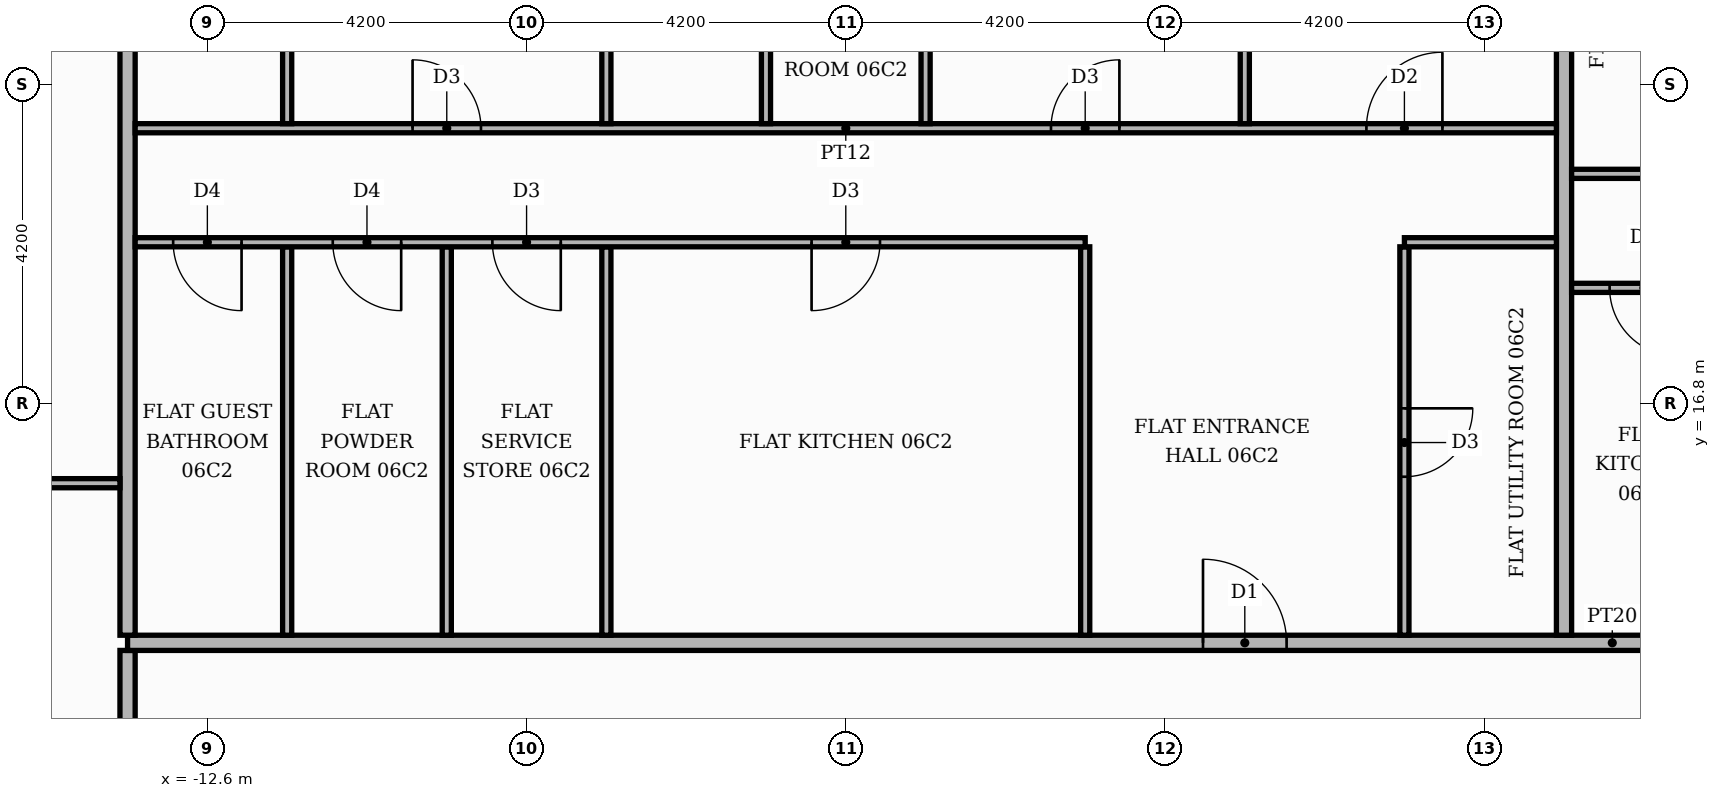
"""IFC4 building model, lengths in metres.
Left out: names, types, materials, properties, quantities, classifications, styles, units other than length and angle.
Written with IfcOpenShell. Run it as: python <this file> out.ifc"""

import sys

from ifc_helpers import new_model, si_unit, direction, frame, frame_2d, origin, place, context, subcontext, project, spatial, rectangle, extrude, element, fill, save


model = new_model("IFC4")
c1 = context("Model", 3, precision=1e-05, world=origin(), true_north=direction((0.0, 1.0)))
c2 = subcontext(c1, "Body", "Model", "MODEL_VIEW")
j1 = project(units=[si_unit("LENGTHUNIT", "METRE"), si_unit("PLANEANGLEUNIT", "RADIAN")], contexts=[c1])
p1 = place(None, origin())
s1 = spatial("IfcSite", under=j1, at=p1, CompositionType="ELEMENT")
p2 = place(p1, origin())
s2 = spatial("IfcBuilding", under=s1, at=p2, CompositionType="ELEMENT")
p3 = place(p2, frame((0.0, 0.0, 30.9)))
s3 = spatial("IfcBuildingStorey", under=s2, at=p3, CompositionType="ELEMENT", Elevation=30.9)
p4 = place(p3, frame((-13.65, -13.55, 0.0), z_axis=(0.0, 0.0, 1.0), x_axis=(0.0, 1.0, 0.0)))
e1 = element("IfcWall", 1, at=p4, inside=s3, PredefinedType="PARTITIONING", context=c2, shape_type="SweptSolid", body=[
    extrude(rectangle(XDim=27.1, YDim=0.2, at=frame_2d((13.55, 0.0))), origin(), (0.0, 0.0, 1.0), 3.48),
])
p5 = place(p4, frame((24.55, 0.0, 0.0)))
e2 = element("IfcOpeningElement", 2, at=p5, cuts=e1, PredefinedType="OPENING", context=c2, shape_type="SweptSolid", body=[
    extrude(rectangle(XDim=1.1, YDim=2.4, at=frame_2d((0.55, 1.2))), frame((0.0, 0.11, 0.0), z_axis=(0.0, -1.0, 0.0), x_axis=(1.0, 0.0, 0.0)), (0.0, 0.0, 1.0), 0.22),
])
p6 = place(p3, frame((-13.65, 13.65, 0.0), z_axis=(0.0, 0.0, 1.0), x_axis=(1.0, 0.0, 0.0)))
e3 = element("IfcWall", 3, at=p6, inside=s3, PredefinedType="PARTITIONING", context=c2, shape_type="SweptSolid", body=[
    extrude(rectangle(XDim=39.07, YDim=0.2, at=frame_2d((19.535, 0.0))), origin(), (0.0, 0.0, 1.0), 3.48),
])
p7 = place(p6, frame((24.65, 0.0, 0.0)))
e4 = element("IfcOpeningElement", 4, at=p7, cuts=e3, PredefinedType="OPENING", context=c2, shape_type="SweptSolid", body=[
    extrude(rectangle(XDim=1.1, YDim=2.4, at=frame_2d((0.55, 1.2))), frame((0.0, 0.11, 0.0), z_axis=(0.0, -1.0, 0.0), x_axis=(1.0, 0.0, 0.0)), (0.0, 0.0, 1.0), 0.22),
])
p8 = place(p6, frame((14.15, 0.0, 0.0)))
e5 = element("IfcOpeningElement", 5, at=p8, cuts=e3, PredefinedType="OPENING", context=c2, shape_type="SweptSolid", body=[
    extrude(rectangle(XDim=1.1, YDim=2.4, at=frame_2d((0.55, 1.2))), frame((0.0, 0.11, 0.0), z_axis=(0.0, -1.0, 0.0), x_axis=(1.0, 0.0, 0.0)), (0.0, 0.0, 1.0), 0.22),
])
p9 = place(p3, frame((-13.65, 13.75, 0.0), z_axis=(0.0, 0.0, 1.0), x_axis=(0.0, 1.0, 0.0)))
e6 = element("IfcWall", 6, at=p9, inside=s3, PredefinedType="PARTITIONING", context=c2, shape_type="SweptSolid", body=[
    extrude(rectangle(XDim=11.67, YDim=0.2, at=frame_2d((5.835, 0.0))), origin(), (0.0, 0.0, 1.0), 3.48),
])
for number, where, z_axis, x_axis in (
    (7, (-11.55, 13.75, 0.0), (0.0, 0.0, 1.0), (0.0, 1.0, 0.0)),
    (8, (-9.45, 13.75, 0.0), (0.0, 0.0, 1.0), (0.0, 1.0, 0.0)),
    (9, (-7.35, 13.75, 0.0), (0.0, 0.0, 1.0), (0.0, 1.0, 0.0)),
    (10, (-1.05, 13.75, 0.0), (0.0, 0.0, 1.0), (0.0, 1.0, 0.0)),
):
    element("IfcWall", number, at=place(p3, frame(where, z_axis=z_axis, x_axis=x_axis)), inside=s3, PredefinedType="PARTITIONING", context=c2, shape_type="SweptSolid", body=[
        extrude(rectangle(XDim=5.11, YDim=0.12, at=frame_2d((2.555, 0.0))), origin(), (0.0, 0.0, 1.0), 3.48),
    ])
p10 = place(p3, frame((3.15, 13.75, 0.0), z_axis=(0.0, 0.0, 1.0), x_axis=(0.0, 1.0, 0.0)))
e11 = element("IfcWall", 11, at=p10, inside=s3, PredefinedType="PARTITIONING", context=c2, shape_type="SweptSolid", body=[
    extrude(rectangle(XDim=5.11, YDim=0.12, at=frame_2d((2.555, 0.0))), origin(), (0.0, 0.0, 1.0), 3.48),
])
p11 = place(p10, frame((2.085, 0.0, 0.0)))
e12 = element("IfcOpeningElement", 12, at=p11, cuts=e11, PredefinedType="OPENING", context=c2, shape_type="SweptSolid", body=[
    extrude(rectangle(XDim=0.9, YDim=2.1, at=frame_2d((0.45, 1.05))), frame((0.0, 0.07, 0.0), z_axis=(0.0, -1.0, 0.0), x_axis=(1.0, 0.0, 0.0)), (0.0, 0.0, 1.0), 0.14),
])
p12 = place(p3, frame((5.25, 13.75, 0.0), z_axis=(0.0, 0.0, 1.0), x_axis=(0.0, 1.0, 0.0)))
e13 = element("IfcWall", 13, at=p12, inside=s3, PredefinedType="PARTITIONING", context=c2, shape_type="SweptSolid", body=[
    extrude(rectangle(XDim=11.67, YDim=0.2, at=frame_2d((5.835, 0.0))), origin(), (0.0, 0.0, 1.0), 3.48),
])
p13 = place(p3, frame((-20.72, 15.75, 0.0), z_axis=(0.0, 0.0, 1.0), x_axis=(1.0, 0.0, 0.0)))
e14 = element("IfcWall", 14, at=p13, inside=s3, PredefinedType="PARTITIONING", context=c2, shape_type="SweptSolid", body=[
    extrude(rectangle(XDim=6.97, YDim=0.12, at=frame_2d((3.485, 0.0))), origin(), (0.0, 0.0, 1.0), 3.48),
])
p14 = place(p13, frame((3.085, 0.0, 0.0)))
e15 = element("IfcOpeningElement", 15, at=p14, cuts=e14, PredefinedType="OPENING", context=c2, shape_type="SweptSolid", body=[
    extrude(rectangle(XDim=0.9, YDim=2.1, at=frame_2d((0.45, 1.05))), frame((0.0, 0.07, 0.0), z_axis=(0.0, -1.0, 0.0), x_axis=(1.0, 0.0, 0.0)), (0.0, 0.0, 1.0), 0.14),
])
p15 = place(p3, frame((5.35, 18.32, 0.0), z_axis=(0.0, 0.0, 1.0), x_axis=(1.0, 0.0, 0.0)))
e16 = element("IfcWall", 16, at=p15, inside=s3, PredefinedType="PARTITIONING", context=c2, shape_type="SweptSolid", body=[
    extrude(rectangle(XDim=4.1, YDim=0.12, at=frame_2d((2.05, 0.0))), origin(), (0.0, 0.0, 1.0), 3.48),
])
p16 = place(p15, frame((0.5, 0.0, 0.0)))
e17 = element("IfcOpeningElement", 17, at=p16, cuts=e16, PredefinedType="OPENING", context=c2, shape_type="SweptSolid", body=[
    extrude(rectangle(XDim=0.9, YDim=2.1, at=frame_2d((0.45, 1.05))), frame((0.0, 0.07, 0.0), z_axis=(0.0, -1.0, 0.0), x_axis=(1.0, 0.0, 0.0)), (0.0, 0.0, 1.0), 0.14),
])
p17 = place(p3, frame((-13.55, 18.92, 0.0), z_axis=(0.0, 0.0, 1.0), x_axis=(1.0, 0.0, 0.0)))
e18 = element("IfcWall", 18, at=p17, inside=s3, PredefinedType="PARTITIONING", context=c2, shape_type="SweptSolid", body=[
    extrude(rectangle(XDim=12.5, YDim=0.12, at=frame_2d((6.25, 0.0))), origin(), (0.0, 0.0, 1.0), 3.48),
])
p18 = place(p17, frame((8.9, 0.0, 0.0)))
e19 = element("IfcOpeningElement", 19, at=p18, cuts=e18, PredefinedType="OPENING", context=c2, shape_type="SweptSolid", body=[
    extrude(rectangle(XDim=0.9, YDim=2.1, at=frame_2d((0.45, 1.05))), frame((0.0, 0.07, 0.0), z_axis=(0.0, -1.0, 0.0), x_axis=(1.0, 0.0, 0.0)), (0.0, 0.0, 1.0), 0.14),
])
p19 = place(p17, frame((4.7, 0.0, 0.0)))
e20 = element("IfcOpeningElement", 20, at=p19, cuts=e18, PredefinedType="OPENING", context=c2, shape_type="SweptSolid", body=[
    extrude(rectangle(XDim=0.9, YDim=2.1, at=frame_2d((0.45, 1.05))), frame((0.0, 0.07, 0.0), z_axis=(0.0, -1.0, 0.0), x_axis=(1.0, 0.0, 0.0)), (0.0, 0.0, 1.0), 0.14),
])
p20 = place(p17, frame((2.6, 0.0, 0.0)))
e21 = element("IfcOpeningElement", 21, at=p20, cuts=e18, PredefinedType="OPENING", context=c2, shape_type="SweptSolid", body=[
    extrude(rectangle(XDim=0.9, YDim=2.1, at=frame_2d((0.45, 1.05))), frame((0.0, 0.07, 0.0), z_axis=(0.0, -1.0, 0.0), x_axis=(1.0, 0.0, 0.0)), (0.0, 0.0, 1.0), 0.14),
])
p21 = place(p17, frame((0.5, 0.0, 0.0)))
e22 = element("IfcOpeningElement", 22, at=p21, cuts=e18, PredefinedType="OPENING", context=c2, shape_type="SweptSolid", body=[
    extrude(rectangle(XDim=0.9, YDim=2.1, at=frame_2d((0.45, 1.05))), frame((0.0, 0.07, 0.0), z_axis=(0.0, -1.0, 0.0), x_axis=(1.0, 0.0, 0.0)), (0.0, 0.0, 1.0), 0.14),
])
p22 = place(p3, frame((3.15, 18.92, 0.0), z_axis=(0.0, 0.0, 1.0), x_axis=(1.0, 0.0, 0.0)))
e23 = element("IfcWall", 23, at=p22, inside=s3, PredefinedType="PARTITIONING", context=c2, shape_type="SweptSolid", body=[
    extrude(rectangle(XDim=2.0, YDim=0.12, at=frame_2d((1.0, 0.0))), origin(), (0.0, 0.0, 1.0), 3.48),
])
p23 = place(p3, frame((5.35, 19.82, 0.0), z_axis=(0.0, 0.0, 1.0), x_axis=(1.0, 0.0, 0.0)))
e24 = element("IfcWall", 24, at=p23, inside=s3, PredefinedType="PARTITIONING", context=c2, shape_type="SweptSolid", body=[
    extrude(rectangle(XDim=11.95, YDim=0.12, at=frame_2d((5.975, 0.0))), origin(), (0.0, 0.0, 1.0), 3.48),
])
p24 = place(p23, frame((8.85, 0.0, 0.0)))
e25 = element("IfcOpeningElement", 25, at=p24, cuts=e24, PredefinedType="OPENING", context=c2, shape_type="SweptSolid", body=[
    extrude(rectangle(XDim=1.0, YDim=2.1, at=frame_2d((0.5, 1.05))), frame((0.0, 0.07, 0.0), z_axis=(0.0, -1.0, 0.0), x_axis=(1.0, 0.0, 0.0)), (0.0, 0.0, 1.0), 0.14),
])
p25 = place(p23, frame((5.75, 0.0, 0.0)))
e26 = element("IfcOpeningElement", 26, at=p25, cuts=e24, PredefinedType="OPENING", context=c2, shape_type="SweptSolid", body=[
    extrude(rectangle(XDim=0.9, YDim=2.1, at=frame_2d((0.45, 1.05))), frame((0.0, 0.07, 0.0), z_axis=(0.0, -1.0, 0.0), x_axis=(1.0, 0.0, 0.0)), (0.0, 0.0, 1.0), 0.14),
])
p26 = place(p3, frame((-13.55, 20.42, 0.0), z_axis=(0.0, 0.0, 1.0), x_axis=(1.0, 0.0, 0.0)))
e27 = element("IfcWall", 27, at=p26, inside=s3, PredefinedType="PARTITIONING", context=c2, shape_type="SweptSolid", body=[
    extrude(rectangle(XDim=18.7, YDim=0.12, at=frame_2d((9.35, 0.0))), origin(), (0.0, 0.0, 1.0), 3.48),
])
p27 = place(p26, frame((16.2, 0.0, 0.0)))
e28 = element("IfcOpeningElement", 28, at=p27, cuts=e27, PredefinedType="OPENING", context=c2, shape_type="SweptSolid", body=[
    extrude(rectangle(XDim=1.0, YDim=2.1, at=frame_2d((0.5, 1.05))), frame((0.0, 0.07, 0.0), z_axis=(0.0, -1.0, 0.0), x_axis=(1.0, 0.0, 0.0)), (0.0, 0.0, 1.0), 0.14),
])
p28 = place(p26, frame((12.05, 0.0, 0.0)))
e29 = element("IfcOpeningElement", 29, at=p28, cuts=e27, PredefinedType="OPENING", context=c2, shape_type="SweptSolid", body=[
    extrude(rectangle(XDim=0.9, YDim=2.1, at=frame_2d((0.45, 1.05))), frame((0.0, 0.07, 0.0), z_axis=(0.0, -1.0, 0.0), x_axis=(1.0, 0.0, 0.0)), (0.0, 0.0, 1.0), 0.14),
])
p29 = place(p26, frame((3.65, 0.0, 0.0)))
e30 = element("IfcOpeningElement", 30, at=p29, cuts=e27, PredefinedType="OPENING", context=c2, shape_type="SweptSolid", body=[
    extrude(rectangle(XDim=0.9, YDim=2.1, at=frame_2d((0.45, 1.05))), frame((0.0, 0.07, 0.0), z_axis=(0.0, -1.0, 0.0), x_axis=(1.0, 0.0, 0.0)), (0.0, 0.0, 1.0), 0.14),
])
p30 = place(p3, frame((-11.55, 20.48, 0.0), z_axis=(0.0, 0.0, 1.0), x_axis=(0.0, 1.0, 0.0)))
e31 = element("IfcWall", 31, at=p30, inside=s3, PredefinedType="PARTITIONING", context=c2, shape_type="SweptSolid", body=[
    extrude(rectangle(XDim=4.94, YDim=0.12, at=frame_2d((2.47, 0.0))), origin(), (0.0, 0.0, 1.0), 3.48),
])
p31 = place(p30, frame((2.14, 0.0, 0.0)))
e32 = element("IfcOpeningElement", 32, at=p31, cuts=e31, PredefinedType="OPENING", context=c2, shape_type="SweptSolid", body=[
    extrude(rectangle(XDim=0.9, YDim=2.1, at=frame_2d((0.45, 1.05))), frame((0.0, 0.07, 0.0), z_axis=(0.0, -1.0, 0.0), x_axis=(1.0, 0.0, 0.0)), (0.0, 0.0, 1.0), 0.14),
])
p32 = place(p3, frame((-7.35, 20.48, 0.0), z_axis=(0.0, 0.0, 1.0), x_axis=(0.0, 1.0, 0.0)))
e33 = element("IfcWall", 33, at=p32, inside=s3, PredefinedType="PARTITIONING", context=c2, shape_type="SweptSolid", body=[
    extrude(rectangle(XDim=4.94, YDim=0.12, at=frame_2d((2.47, 0.0))), origin(), (0.0, 0.0, 1.0), 3.48),
])
p33 = place(p3, frame((-5.25, 20.48, 0.0), z_axis=(0.0, 0.0, 1.0), x_axis=(0.0, 1.0, 0.0)))
e34 = element("IfcWall", 34, at=p33, inside=s3, PredefinedType="PARTITIONING", context=c2, shape_type="SweptSolid", body=[
    extrude(rectangle(XDim=4.94, YDim=0.12, at=frame_2d((2.47, 0.0))), origin(), (0.0, 0.0, 1.0), 3.48),
])
p34 = place(p33, frame((2.14, 0.0, 0.0)))
e35 = element("IfcOpeningElement", 35, at=p34, cuts=e34, PredefinedType="OPENING", context=c2, shape_type="SweptSolid", body=[
    extrude(rectangle(XDim=0.9, YDim=2.1, at=frame_2d((0.45, 1.05))), frame((0.0, 0.07, 0.0), z_axis=(0.0, -1.0, 0.0), x_axis=(1.0, 0.0, 0.0)), (0.0, 0.0, 1.0), 0.14),
])
p35 = place(p3, frame((-3.15, 20.48, 0.0), z_axis=(0.0, 0.0, 1.0), x_axis=(0.0, 1.0, 0.0)))
e36 = element("IfcWall", 36, at=p35, inside=s3, PredefinedType="PARTITIONING", context=c2, shape_type="SweptSolid", body=[
    extrude(rectangle(XDim=4.94, YDim=0.12, at=frame_2d((2.47, 0.0))), origin(), (0.0, 0.0, 1.0), 3.48),
])
p36 = place(p35, frame((2.14, 0.0, 0.0)))
e37 = element("IfcOpeningElement", 37, at=p36, cuts=e36, PredefinedType="OPENING", context=c2, shape_type="SweptSolid", body=[
    extrude(rectangle(XDim=0.9, YDim=2.1, at=frame_2d((0.45, 1.05))), frame((0.0, 0.07, 0.0), z_axis=(0.0, -1.0, 0.0), x_axis=(1.0, 0.0, 0.0)), (0.0, 0.0, 1.0), 0.14),
])
p37 = place(p3, frame((1.05, 20.48, 0.0), z_axis=(0.0, 0.0, 1.0), x_axis=(0.0, 1.0, 0.0)))
e38 = element("IfcWall", 38, at=p37, inside=s3, PredefinedType="PARTITIONING", context=c2, shape_type="SweptSolid", body=[
    extrude(rectangle(XDim=4.94, YDim=0.12, at=frame_2d((2.47, 0.0))), origin(), (0.0, 0.0, 1.0), 3.48),
])
p38 = place(p16, frame((0.9, 0.0, 0.0), z_axis=(0.0, 0.0, 1.0), x_axis=(-1.0, 0.0, 0.0)))
e39 = element("IfcDoor", 39, at=p38, inside=s3, OperationType="SINGLE_SWING_RIGHT", PredefinedType="DOOR", context=c2, shape_type="SweptSolid", body=[
    extrude(rectangle(XDim=0.9, YDim=2.1, at=frame_2d((0.45, 1.05))), frame((0.0, 0.025, 0.0), z_axis=(0.0, -1.0, 0.0), x_axis=(1.0, 0.0, 0.0)), (0.0, 0.0, 1.0), 0.05),
])
fill(e17, e39)
p39 = place(p8, origin())
e40 = element("IfcDoor", 40, at=p39, inside=s3, OperationType="SINGLE_SWING_LEFT", PredefinedType="DOOR", context=c2, shape_type="SweptSolid", body=[
    extrude(rectangle(XDim=1.1, YDim=2.4, at=frame_2d((0.55, 1.2))), frame((0.0, 0.025, 0.0), z_axis=(0.0, -1.0, 0.0), x_axis=(1.0, 0.0, 0.0)), (0.0, 0.0, 1.0), 0.05),
])
fill(e5, e40)
p40 = place(p11, frame((0.9, 0.0, 0.0), z_axis=(0.0, 0.0, 1.0), x_axis=(-1.0, 0.0, 0.0)))
e41 = element("IfcDoor", 41, at=p40, inside=s3, OperationType="SINGLE_SWING_RIGHT", PredefinedType="DOOR", context=c2, shape_type="SweptSolid", body=[
    extrude(rectangle(XDim=0.9, YDim=2.1, at=frame_2d((0.45, 1.05))), frame((0.0, 0.025, 0.0), z_axis=(0.0, -1.0, 0.0), x_axis=(1.0, 0.0, 0.0)), (0.0, 0.0, 1.0), 0.05),
])
fill(e12, e41)
p41 = place(p18, frame((0.9, 0.0, 0.0), z_axis=(0.0, 0.0, 1.0), x_axis=(-1.0, 0.0, 0.0)))
e42 = element("IfcDoor", 42, at=p41, inside=s3, OperationType="SINGLE_SWING_LEFT", PredefinedType="DOOR", context=c2, shape_type="SweptSolid", body=[
    extrude(rectangle(XDim=0.9, YDim=2.1, at=frame_2d((0.45, 1.05))), frame((0.0, 0.025, 0.0), z_axis=(0.0, -1.0, 0.0), x_axis=(1.0, 0.0, 0.0)), (0.0, 0.0, 1.0), 0.05),
])
fill(e19, e42)
p42 = place(p19, frame((0.9, 0.0, 0.0), z_axis=(0.0, 0.0, 1.0), x_axis=(-1.0, 0.0, 0.0)))
e43 = element("IfcDoor", 43, at=p42, inside=s3, OperationType="SINGLE_SWING_RIGHT", PredefinedType="DOOR", context=c2, shape_type="SweptSolid", body=[
    extrude(rectangle(XDim=0.9, YDim=2.1, at=frame_2d((0.45, 1.05))), frame((0.0, 0.025, 0.0), z_axis=(0.0, -1.0, 0.0), x_axis=(1.0, 0.0, 0.0)), (0.0, 0.0, 1.0), 0.05),
])
fill(e20, e43)
p43 = place(p20, frame((0.9, 0.0, 0.0), z_axis=(0.0, 0.0, 1.0), x_axis=(-1.0, 0.0, 0.0)))
e44 = element("IfcDoor", 44, at=p43, inside=s3, OperationType="SINGLE_SWING_RIGHT", PredefinedType="DOOR", context=c2, shape_type="SweptSolid", body=[
    extrude(rectangle(XDim=0.9, YDim=2.1, at=frame_2d((0.45, 1.05))), frame((0.0, 0.025, 0.0), z_axis=(0.0, -1.0, 0.0), x_axis=(1.0, 0.0, 0.0)), (0.0, 0.0, 1.0), 0.05),
])
fill(e21, e44)
p44 = place(p21, frame((0.9, 0.0, 0.0), z_axis=(0.0, 0.0, 1.0), x_axis=(-1.0, 0.0, 0.0)))
e45 = element("IfcDoor", 45, at=p44, inside=s3, OperationType="SINGLE_SWING_RIGHT", PredefinedType="DOOR", context=c2, shape_type="SweptSolid", body=[
    extrude(rectangle(XDim=0.9, YDim=2.1, at=frame_2d((0.45, 1.05))), frame((0.0, 0.025, 0.0), z_axis=(0.0, -1.0, 0.0), x_axis=(1.0, 0.0, 0.0)), (0.0, 0.0, 1.0), 0.05),
])
fill(e22, e45)
p45 = place(p27, origin())
e46 = element("IfcDoor", 46, at=p45, inside=s3, OperationType="SINGLE_SWING_RIGHT", PredefinedType="DOOR", context=c2, shape_type="SweptSolid", body=[
    extrude(rectangle(XDim=1.0, YDim=2.1, at=frame_2d((0.5, 1.05))), frame((0.0, 0.025, 0.0), z_axis=(0.0, -1.0, 0.0), x_axis=(1.0, 0.0, 0.0)), (0.0, 0.0, 1.0), 0.05),
])
fill(e28, e46)
p46 = place(p28, origin())
e47 = element("IfcDoor", 47, at=p46, inside=s3, OperationType="SINGLE_SWING_RIGHT", PredefinedType="DOOR", context=c2, shape_type="SweptSolid", body=[
    extrude(rectangle(XDim=0.9, YDim=2.1, at=frame_2d((0.45, 1.05))), frame((0.0, 0.025, 0.0), z_axis=(0.0, -1.0, 0.0), x_axis=(1.0, 0.0, 0.0)), (0.0, 0.0, 1.0), 0.05),
])
fill(e29, e47)
p47 = place(p29, origin())
e48 = element("IfcDoor", 48, at=p47, inside=s3, OperationType="SINGLE_SWING_LEFT", PredefinedType="DOOR", context=c2, shape_type="SweptSolid", body=[
    extrude(rectangle(XDim=0.9, YDim=2.1, at=frame_2d((0.45, 1.05))), frame((0.0, 0.025, 0.0), z_axis=(0.0, -1.0, 0.0), x_axis=(1.0, 0.0, 0.0)), (0.0, 0.0, 1.0), 0.05),
])
fill(e30, e48)
save(model, sys.argv[1])
